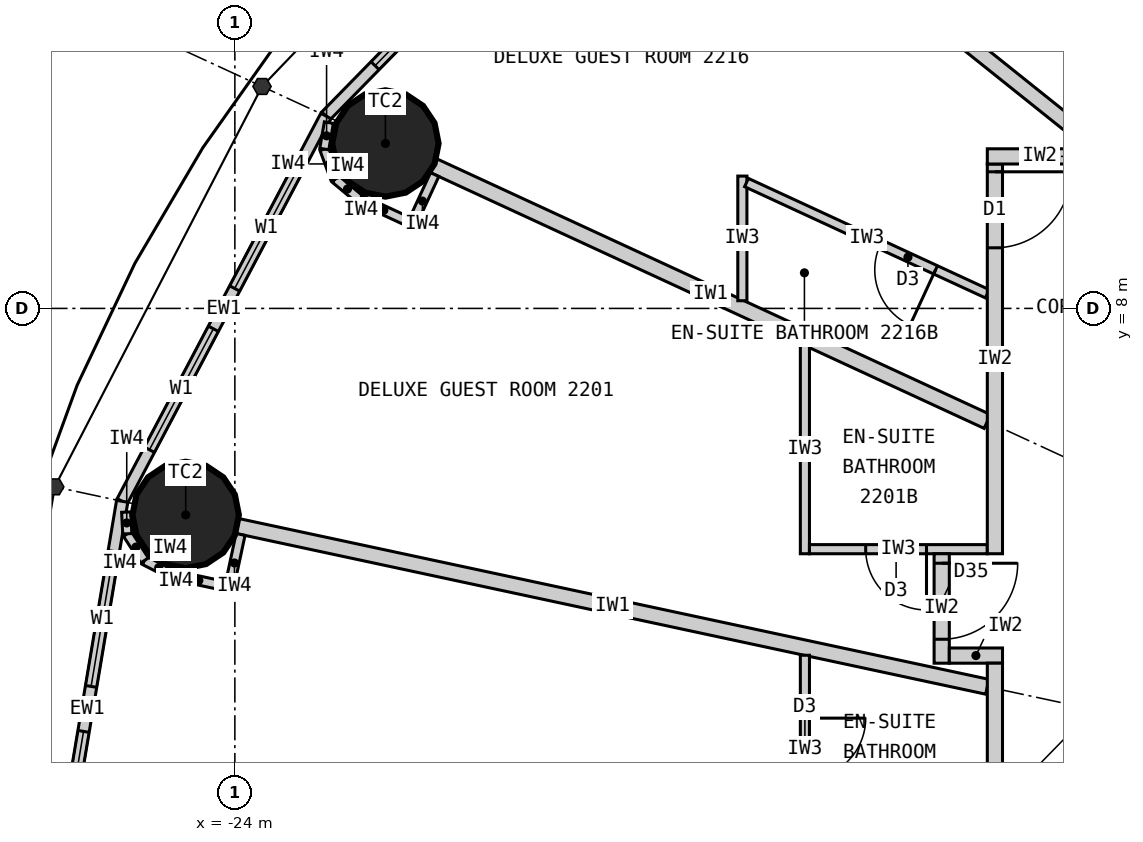
"""IFC4 building model, lengths in metres.
Left out: names, types, materials, properties, quantities, classifications, styles, units other than length and angle.
Written with IfcOpenShell. Run it as: python <this file> out.ifc"""

import sys

from ifc_helpers import new_model, si_unit, direction, frame, frame_2d, origin, origin_2d, place, context, subcontext, project, spatial, rectangle, circle, extrude, element, fill, save


model = new_model("IFC4")
c1 = context("Model", 3, precision=1e-05, world=origin(), true_north=direction((0.0, 1.0)))
c2 = subcontext(c1, "Body", "Model", "MODEL_VIEW")
j1 = project(units=[si_unit("LENGTHUNIT", "METRE"), si_unit("PLANEANGLEUNIT", "RADIAN")], contexts=[c1])
p1 = place(None, origin())
s1 = spatial("IfcSite", under=j1, at=p1, CompositionType="ELEMENT")
p2 = place(p1, origin())
s2 = spatial("IfcBuilding", under=s1, at=p2, CompositionType="ELEMENT")
p3 = place(p2, frame((0.0, 0.0, 87.0)))
s3 = spatial("IfcBuildingStorey", under=s2, at=p3, CompositionType="ELEMENT", Elevation=87.0)
for number, where, z_axis, x_axis in (
    (1, (-22.019, 10.17, 0.0), (0.0, 0.0, 1.0), (1.0, 0.0, 0.0)),
    (2, (-24.647, 5.283, 0.0), (0.0, 0.0, 1.0), (1.0, 0.0, 0.0)),
):
    element("IfcColumn", number, at=place(p3, frame(where, z_axis=z_axis, x_axis=x_axis)), inside=s3, PredefinedType="COLUMN", context=c2, shape_type="SweptSolid", body=[
        extrude(circle(Radius=0.7, at=origin_2d()), origin(), (0.0, 0.0, 1.0), 3.3),
    ])
p4 = place(p3, frame((-18.57, 14.856, 0.0), z_axis=(0.0, 0.0, 1.0), x_axis=(-0.699602905915, -0.714531856557, 0.0)))
e3 = element("IfcWall", 3, at=p4, inside=s3, PredefinedType="ELEMENTEDWALL", context=c2, shape_type="SweptSolid", body=[
    extrude(rectangle(XDim=6.051, YDim=0.15, at=frame_2d((3.025, 0.0))), origin(), (0.0, 0.0, 1.0), 3.12),
])
p5 = place(p4, frame((0.926, 0.0, 0.9)))
e4 = element("IfcOpeningElement", 4, at=p5, cuts=e3, PredefinedType="OPENING", context=c2, shape_type="SweptSolid", body=[
    extrude(rectangle(XDim=1.8, YDim=1.9, at=frame_2d((0.9, 0.95))), frame((0.0, 0.085, 0.0), z_axis=(0.0, -1.0, 0.0), x_axis=(1.0, 0.0, 0.0)), (0.0, 0.0, 1.0), 0.17),
])
p6 = place(p4, frame((3.325, 0.0, 0.9)))
e5 = element("IfcOpeningElement", 5, at=p6, cuts=e3, PredefinedType="OPENING", context=c2, shape_type="SweptSolid", body=[
    extrude(rectangle(XDim=1.8, YDim=1.9, at=frame_2d((0.9, 0.95))), frame((0.0, 0.085, 0.0), z_axis=(0.0, -1.0, 0.0), x_axis=(1.0, 0.0, 0.0)), (0.0, 0.0, 1.0), 0.17),
])
p7 = place(p3, frame((-22.803, 10.532, 0.0), z_axis=(0.0, 0.0, 1.0), x_axis=(-0.467296867008, -0.884100468321, 0.0)))
e6 = element("IfcWall", 6, at=p7, inside=s3, PredefinedType="ELEMENTEDWALL", context=c2, shape_type="SweptSolid", body=[
    extrude(rectangle(XDim=5.734, YDim=0.15, at=frame_2d((2.867, 0.0))), origin(), (0.0, 0.0, 1.0), 3.12),
])
p8 = place(p7, frame((0.767, 0.0, 0.9)))
e7 = element("IfcOpeningElement", 7, at=p8, cuts=e6, PredefinedType="OPENING", context=c2, shape_type="SweptSolid", body=[
    extrude(rectangle(XDim=1.8, YDim=1.9, at=frame_2d((0.9, 0.95))), frame((0.0, 0.085, 0.0), z_axis=(0.0, -1.0, 0.0), x_axis=(1.0, 0.0, 0.0)), (0.0, 0.0, 1.0), 0.17),
])
p9 = place(p7, frame((3.167, 0.0, 0.9)))
e8 = element("IfcOpeningElement", 8, at=p9, cuts=e6, PredefinedType="OPENING", context=c2, shape_type="SweptSolid", body=[
    extrude(rectangle(XDim=1.8, YDim=1.9, at=frame_2d((0.9, 0.95))), frame((0.0, 0.085, 0.0), z_axis=(0.0, -1.0, 0.0), x_axis=(1.0, 0.0, 0.0)), (0.0, 0.0, 1.0), 0.17),
])
p10 = place(p3, frame((-25.482, 5.462, 0.0), z_axis=(0.0, 0.0, 1.0), x_axis=(-0.165642551694, -0.986185857264, 0.0)))
e9 = element("IfcWall", 9, at=p10, inside=s3, PredefinedType="ELEMENTEDWALL", context=c2, shape_type="SweptSolid", body=[
    extrude(rectangle(XDim=5.539, YDim=0.15, at=frame_2d((2.77, 0.0))), origin(), (0.0, 0.0, 1.0), 3.12),
])
p11 = place(p10, frame((0.669, 0.0, 0.9)))
e10 = element("IfcOpeningElement", 10, at=p11, cuts=e9, PredefinedType="OPENING", context=c2, shape_type="SweptSolid", body=[
    extrude(rectangle(XDim=1.8, YDim=1.9, at=frame_2d((0.9, 0.95))), frame((0.0, 0.085, 0.0), z_axis=(0.0, -1.0, 0.0), x_axis=(1.0, 0.0, 0.0)), (0.0, 0.0, 1.0), 0.17),
])
p12 = place(p10, frame((3.07, 0.0, 0.9)))
e11 = element("IfcOpeningElement", 11, at=p12, cuts=e9, PredefinedType="OPENING", context=c2, shape_type="SweptSolid", body=[
    extrude(rectangle(XDim=1.8, YDim=1.9, at=frame_2d((0.9, 0.95))), frame((0.0, 0.085, 0.0), z_axis=(0.0, -1.0, 0.0), x_axis=(1.0, 0.0, 0.0)), (0.0, 0.0, 1.0), 0.17),
])
p13 = place(p3, frame((-12.625, 10.1, 0.0), z_axis=(0.0, 0.0, 1.0), x_axis=(-0.780892451574, 0.624665493744, 0.0)))
e12 = element("IfcWall", 12, at=p13, inside=s3, PredefinedType="PARTITIONING", context=c2, shape_type="SweptSolid", body=[
    extrude(rectangle(XDim=6.045, YDim=0.2, at=frame_2d((3.022, 0.0))), origin(), (0.0, 0.0, 1.0), 2.27),
])
p14 = place(p3, frame((-14.1, 6.512, 0.0), z_axis=(0.0, 0.0, 1.0), x_axis=(-0.907832871056, 0.419332181247, 0.0)))
e13 = element("IfcWall", 13, at=p14, inside=s3, PredefinedType="PARTITIONING", context=c2, shape_type="SweptSolid", body=[
    extrude(rectangle(XDim=8.023, YDim=0.2, at=frame_2d((4.011, 0.0))), origin(), (0.0, 0.0, 1.0), 2.22),
])
p15 = place(p3, frame((-14.1, 3.022, 0.0), z_axis=(0.0, 0.0, 1.0), x_axis=(-0.977790014929, 0.209586943072, 0.0)))
e14 = element("IfcWall", 14, at=p15, inside=s3, PredefinedType="PARTITIONING", context=c2, shape_type="SweptSolid", body=[
    extrude(rectangle(XDim=10.087, YDim=0.2, at=frame_2d((5.043, 0.0))), origin(), (0.0, 0.0, 1.0), 2.27),
])
p16 = place(p3, frame((-16.5, 7.521, 0.0), z_axis=(0.0, 0.0, 1.0), x_axis=(0.0, -1.0, 0.0)))
e15 = element("IfcWall", 15, at=p16, inside=s3, PredefinedType="PARTITIONING", context=c2, shape_type="SweptSolid", body=[
    extrude(rectangle(XDim=2.749, YDim=0.12, at=frame_2d((1.374, 0.0))), origin(), (0.0, 0.0, 1.0), 3.12),
])
p17 = place(p3, frame((-14.1, 4.833, 0.0), z_axis=(0.0, 0.0, 1.0), x_axis=(-1.0, 0.0, 0.0)))
e16 = element("IfcWall", 16, at=p17, inside=s3, PredefinedType="PARTITIONING", context=c2, shape_type="SweptSolid", body=[
    extrude(rectangle(XDim=2.34, YDim=0.12, at=frame_2d((1.17, 0.0))), origin(), (0.0, 0.0, 1.0), 3.12),
])
p18 = place(p17, frame((0.8, 0.0, 0.0)))
e17 = element("IfcOpeningElement", 17, at=p18, cuts=e16, PredefinedType="OPENING", context=c2, shape_type="SweptSolid", body=[
    extrude(rectangle(XDim=0.8, YDim=2.1, at=frame_2d((0.4, 1.05))), frame((0.0, 0.07, 0.0), z_axis=(0.0, -1.0, 0.0), x_axis=(1.0, 0.0, 0.0)), (0.0, 0.0, 1.0), 0.14),
])
p19 = place(p3, frame((-16.5, 3.437, 0.0), z_axis=(0.0, 0.0, 1.0), x_axis=(0.0, -1.0, 0.0)))
e18 = element("IfcWall", 18, at=p19, inside=s3, PredefinedType="PARTITIONING", context=c2, shape_type="SweptSolid", body=[
    extrude(rectangle(XDim=2.455, YDim=0.12, at=frame_2d((1.227, 0.0))), origin(), (0.0, 0.0, 1.0), 3.12),
])
p20 = place(p19, frame((0.827, 0.0, 0.0)))
e19 = element("IfcOpeningElement", 19, at=p20, cuts=e18, PredefinedType="OPENING", context=c2, shape_type="SweptSolid", body=[
    extrude(rectangle(XDim=0.8, YDim=2.1, at=frame_2d((0.4, 1.05))), frame((0.0, 0.07, 0.0), z_axis=(0.0, -1.0, 0.0), x_axis=(1.0, 0.0, 0.0)), (0.0, 0.0, 1.0), 0.14),
])
p21 = place(p3, frame((-17.323, 8.101, 0.0), z_axis=(0.0, 0.0, 1.0), x_axis=(0.0, 1.0, 0.0)))
e20 = element("IfcWall", 20, at=p21, inside=s3, PredefinedType="PARTITIONING", context=c2, shape_type="SweptSolid", body=[
    extrude(rectangle(XDim=1.64, YDim=0.12, at=frame_2d((0.82, 0.0))), origin(), (0.0, 0.0, 1.0), 3.12),
])
p22 = place(p3, frame((-14.1, 8.193, 0.0), z_axis=(0.0, 0.0, 1.0), x_axis=(-0.907836493557, 0.419324338628, 0.0)))
e21 = element("IfcWall", 21, at=p22, inside=s3, PredefinedType="PARTITIONING", context=c2, shape_type="SweptSolid", body=[
    extrude(rectangle(XDim=3.49, YDim=0.12, at=frame_2d((1.745, 0.0))), origin(), (0.0, 0.0, 1.0), 3.12),
])
p23 = place(p22, frame((0.75, 0.0, 0.0)))
e22 = element("IfcOpeningElement", 22, at=p23, cuts=e21, PredefinedType="OPENING", context=c2, shape_type="SweptSolid", body=[
    extrude(rectangle(XDim=0.8, YDim=2.1, at=frame_2d((0.4, 1.05))), frame((0.0, 0.07, 0.0), z_axis=(0.0, -1.0, 0.0), x_axis=(1.0, 0.0, 0.0)), (0.0, 0.0, 1.0), 0.14),
])
p24 = place(p3, frame((-14.7, 4.772, 0.0), z_axis=(0.0, 0.0, 1.0), x_axis=(0.0, -1.0, 0.0)))
e23 = element("IfcWall", 23, at=p24, inside=s3, PredefinedType="PARTITIONING", context=c2, shape_type="SweptSolid", body=[
    extrude(rectangle(XDim=1.44, YDim=0.2, at=frame_2d((0.72, 0.0))), origin(), (0.0, 0.0, 1.0), 3.12),
])
p25 = place(p24, frame((0.125, 0.0, 0.0)))
e24 = element("IfcOpeningElement", 24, at=p25, cuts=e23, PredefinedType="OPENING", context=c2, shape_type="SweptSolid", body=[
    extrude(rectangle(XDim=1.0, YDim=2.0, at=frame_2d((0.5, 1.0))), frame((0.0, 0.11, 0.0), z_axis=(0.0, -1.0, 0.0), x_axis=(1.0, 0.0, 0.0)), (0.0, 0.0, 1.0), 0.22),
])
p26 = place(p3, frame((-13.9, 3.433, 0.0), z_axis=(0.0, 0.0, 1.0), x_axis=(-1.0, 0.0, 0.0)))
e25 = element("IfcWall", 25, at=p26, inside=s3, PredefinedType="PARTITIONING", context=c2, shape_type="SweptSolid", body=[
    extrude(rectangle(XDim=0.7, YDim=0.2, at=frame_2d((0.35, 0.0))), origin(), (0.0, 0.0, 1.0), 2.27),
])
p27 = place(p3, frame((-14.0, 9.9, 0.0), z_axis=(0.0, 0.0, 1.0), x_axis=(0.0, -1.0, 0.0)))
e26 = element("IfcWall", 26, at=p27, inside=s3, PredefinedType="PARTITIONING", context=c2, shape_type="SweptSolid", body=[
    extrude(rectangle(XDim=5.127, YDim=0.2, at=frame_2d((2.564, 0.0))), origin(), (0.0, 0.0, 1.0), 3.12),
])
p28 = place(p27, frame((0.103, 0.0, 0.0)))
e27 = element("IfcOpeningElement", 27, at=p28, cuts=e26, PredefinedType="OPENING", context=c2, shape_type="SweptSolid", body=[
    extrude(rectangle(XDim=1.0, YDim=2.2, at=frame_2d((0.5, 1.1))), frame((0.0, 0.11, 0.0), z_axis=(0.0, -1.0, 0.0), x_axis=(1.0, 0.0, 0.0)), (0.0, 0.0, 1.0), 0.22),
])
p29 = place(p3, frame((-14.0, 3.333, 0.0), z_axis=(0.0, 0.0, 1.0), x_axis=(0.0, -1.0, 0.0)))
e28 = element("IfcWall", 28, at=p29, inside=s3, PredefinedType="PARTITIONING", context=c2, shape_type="SweptSolid", body=[
    extrude(rectangle(XDim=8.792, YDim=0.2, at=frame_2d((4.396, 0.0))), origin(), (0.0, 0.0, 1.0), 3.12),
])
p30 = place(p29, frame((3.59, 0.0, 0.0)))
e29 = element("IfcOpeningElement", 29, at=p30, cuts=e28, PredefinedType="OPENING", context=c2, shape_type="SweptSolid", body=[
    extrude(rectangle(XDim=1.0, YDim=2.2, at=frame_2d((0.5, 1.1))), frame((0.0, 0.11, 0.0), z_axis=(0.0, -1.0, 0.0), x_axis=(1.0, 0.0, 0.0)), (0.0, 0.0, 1.0), 0.22),
])
p31 = place(p29, frame((5.234, 0.0, 0.0)))
e30 = element("IfcOpeningElement", 30, at=p31, cuts=e28, PredefinedType="OPENING", context=c2, shape_type="SweptSolid", body=[
    extrude(rectangle(XDim=1.0, YDim=2.2, at=frame_2d((0.5, 1.1))), frame((0.0, 0.11, 0.0), z_axis=(0.0, -1.0, 0.0), x_axis=(1.0, 0.0, 0.0)), (0.0, 0.0, 1.0), 0.22),
])
p32 = place(p3, frame((-14.1, 10.0, 0.0), z_axis=(0.0, 0.0, 1.0), x_axis=(1.0, 0.0, 0.0)))
e31 = element("IfcWall", 31, at=p32, inside=s3, PredefinedType="PARTITIONING", context=c2, shape_type="SweptSolid", body=[
    extrude(rectangle(XDim=2.481, YDim=0.2, at=frame_2d((1.24, 0.0))), origin(), (0.0, 0.0, 1.0), 3.12),
])
p33 = place(p3, frame((-21.371, 9.761, 0.0), z_axis=(0.0, 0.0, 1.0), x_axis=(-0.419259891039, -0.907866258744, 0.0)))
e32 = element("IfcWall", 32, at=p33, inside=s3, PredefinedType="PARTITIONING", context=c2, shape_type="SweptSolid", body=[
    extrude(rectangle(XDim=0.768, YDim=0.12, at=frame_2d((0.384, 0.0))), origin(), (0.0, 0.0, 1.0), 3.12),
])
p34 = place(p3, frame((-21.722, 9.144, 0.0), z_axis=(0.0, 0.0, 1.0), x_axis=(-0.907877701396, 0.419235112208, 0.0)))
e33 = element("IfcWall", 33, at=p34, inside=s3, PredefinedType="PARTITIONING", context=c2, shape_type="SweptSolid", body=[
    extrude(rectangle(XDim=0.7, YDim=0.12, at=frame_2d((0.35, 0.0))), origin(), (0.0, 0.0, 1.0), 3.12),
])
p35 = place(p3, frame((-22.358, 9.437, 0.0), z_axis=(0.0, 0.0, 1.0), x_axis=(-0.768412687942, 0.639954639806, 0.0)))
e34 = element("IfcWall", 34, at=p35, inside=s3, PredefinedType="PARTITIONING", context=c2, shape_type="SweptSolid", body=[
    extrude(rectangle(XDim=0.418, YDim=0.12, at=frame_2d((0.209, 0.0))), origin(), (0.0, 0.0, 1.0), 3.12),
])
p36 = place(p3, frame((-22.679, 9.705, 0.0), z_axis=(0.0, 0.0, 1.0), x_axis=(-0.345164001646, 0.938542386879, 0.0)))
e35 = element("IfcWall", 35, at=p36, inside=s3, PredefinedType="PARTITIONING", context=c2, shape_type="SweptSolid", body=[
    extrude(rectangle(XDim=0.418, YDim=0.12, at=frame_2d((0.209, 0.0))), origin(), (0.0, 0.0, 1.0), 3.12),
])
p37 = place(p3, frame((-22.823, 10.097, 0.0), z_axis=(0.0, 0.0, 1.0), x_axis=(0.169674995186, 0.985500074079, 0.0)))
e36 = element("IfcWall", 36, at=p37, inside=s3, PredefinedType="PARTITIONING", context=c2, shape_type="SweptSolid", body=[
    extrude(rectangle(XDim=0.353, YDim=0.12, at=frame_2d((0.176, 0.0))), origin(), (0.0, 0.0, 1.0), 3.12),
])
p38 = place(p3, frame((-23.925, 5.026, 0.0), z_axis=(0.0, 0.0, 1.0), x_axis=(-0.209681192172, -0.977769808109, 0.0)))
e37 = element("IfcWall", 37, at=p38, inside=s3, PredefinedType="PARTITIONING", context=c2, shape_type="SweptSolid", body=[
    extrude(rectangle(XDim=0.767, YDim=0.12, at=frame_2d((0.384, 0.0))), origin(), (0.0, 0.0, 1.0), 3.12),
])
p39 = place(p3, frame((-24.132, 4.347, 0.0), z_axis=(0.0, 0.0, 1.0), x_axis=(-0.977776882509, 0.209648200638, 0.0)))
e38 = element("IfcWall", 38, at=p39, inside=s3, PredefinedType="PARTITIONING", context=c2, shape_type="SweptSolid", body=[
    extrude(rectangle(XDim=0.7, YDim=0.12, at=frame_2d((0.35, 0.0))), origin(), (0.0, 0.0, 1.0), 3.12),
])
for number, where, z_axis, x_axis in (
    (39, (-24.816, 4.494, 0.0), (0.0, 0.0, 1.0), (-0.89, 0.455, 0.0)),
    (40, (-25.188, 4.684, 0.0), (0.0, 0.0, 1.0), (-0.543, 0.84, 0.0)),
):
    element("IfcWall", number, at=place(p3, frame(where, z_axis=z_axis, x_axis=x_axis)), inside=s3, PredefinedType="PARTITIONING", context=c2, shape_type="SweptSolid", body=[
        extrude(rectangle(XDim=0.418, YDim=0.12, at=frame_2d((0.209, 0.0))), origin(), (0.0, 0.0, 1.0), 3.12),
    ])
p40 = place(p3, frame((-25.416, 5.035, 0.0), z_axis=(0.0, 0.0, 1.0), x_axis=(-0.050406329159, 0.998728793007, 0.0)))
e41 = element("IfcWall", 41, at=p40, inside=s3, PredefinedType="PARTITIONING", context=c2, shape_type="SweptSolid", body=[
    extrude(rectangle(XDim=0.286, YDim=0.12, at=frame_2d((0.143, 0.0))), origin(), (0.0, 0.0, 1.0), 3.12),
])
p41 = place(p6, origin())
e42 = element("IfcWindow", 42, at=p41, inside=s3, PartitioningType="SINGLE_PANEL", PredefinedType="WINDOW", context=c2, shape_type="SweptSolid", body=[
    extrude(rectangle(XDim=1.8, YDim=1.9, at=frame_2d((0.9, 0.95))), frame((0.0, 0.03, 0.0), z_axis=(0.0, -1.0, 0.0), x_axis=(1.0, 0.0, 0.0)), (0.0, 0.0, 1.0), 0.06),
])
fill(e5, e42)
p42 = place(p8, origin())
e43 = element("IfcWindow", 43, at=p42, inside=s3, PartitioningType="SINGLE_PANEL", PredefinedType="WINDOW", context=c2, shape_type="SweptSolid", body=[
    extrude(rectangle(XDim=1.8, YDim=1.9, at=frame_2d((0.9, 0.95))), frame((0.0, 0.03, 0.0), z_axis=(0.0, -1.0, 0.0), x_axis=(1.0, 0.0, 0.0)), (0.0, 0.0, 1.0), 0.06),
])
fill(e7, e43)
p43 = place(p9, origin())
e44 = element("IfcWindow", 44, at=p43, inside=s3, PartitioningType="SINGLE_PANEL", PredefinedType="WINDOW", context=c2, shape_type="SweptSolid", body=[
    extrude(rectangle(XDim=1.8, YDim=1.9, at=frame_2d((0.9, 0.95))), frame((0.0, 0.03, 0.0), z_axis=(0.0, -1.0, 0.0), x_axis=(1.0, 0.0, 0.0)), (0.0, 0.0, 1.0), 0.06),
])
fill(e8, e44)
p44 = place(p11, origin())
e45 = element("IfcWindow", 45, at=p44, inside=s3, PartitioningType="SINGLE_PANEL", PredefinedType="WINDOW", context=c2, shape_type="SweptSolid", body=[
    extrude(rectangle(XDim=1.8, YDim=1.9, at=frame_2d((0.9, 0.95))), frame((0.0, 0.03, 0.0), z_axis=(0.0, -1.0, 0.0), x_axis=(1.0, 0.0, 0.0)), (0.0, 0.0, 1.0), 0.06),
])
fill(e10, e45)
p45 = place(p12, origin())
e46 = element("IfcWindow", 46, at=p45, inside=s3, PartitioningType="SINGLE_PANEL", PredefinedType="WINDOW", context=c2, shape_type="SweptSolid", body=[
    extrude(rectangle(XDim=1.8, YDim=1.9, at=frame_2d((0.9, 0.95))), frame((0.0, 0.03, 0.0), z_axis=(0.0, -1.0, 0.0), x_axis=(1.0, 0.0, 0.0)), (0.0, 0.0, 1.0), 0.06),
])
fill(e11, e46)
p46 = place(p18, origin())
e47 = element("IfcDoor", 47, at=p46, inside=s3, OperationType="SINGLE_SWING_LEFT", PredefinedType="DOOR", context=c2, shape_type="SweptSolid", body=[
    extrude(rectangle(XDim=0.8, YDim=2.1, at=frame_2d((0.4, 1.05))), frame((0.0, 0.025, 0.0), z_axis=(0.0, -1.0, 0.0), x_axis=(1.0, 0.0, 0.0)), (0.0, 0.0, 1.0), 0.05),
])
fill(e17, e47)
p47 = place(p25, origin())
e48 = element("IfcDoor", 48, at=p47, inside=s3, OperationType="SINGLE_SWING_LEFT", PredefinedType="DOOR", context=c2, shape_type="SweptSolid", body=[
    extrude(rectangle(XDim=1.0, YDim=2.0, at=frame_2d((0.5, 1.0))), frame((0.0, 0.025, 0.0), z_axis=(0.0, -1.0, 0.0), x_axis=(1.0, 0.0, 0.0)), (0.0, 0.0, 1.0), 0.05),
])
fill(e24, e48)
p48 = place(p20, origin())
e49 = element("IfcDoor", 49, at=p48, inside=s3, OperationType="SINGLE_SWING_LEFT", PredefinedType="DOOR", context=c2, shape_type="SweptSolid", body=[
    extrude(rectangle(XDim=0.8, YDim=2.1, at=frame_2d((0.4, 1.05))), frame((0.0, 0.025, 0.0), z_axis=(0.0, -1.0, 0.0), x_axis=(1.0, 0.0, 0.0)), (0.0, 0.0, 1.0), 0.05),
])
fill(e19, e49)
p49 = place(p23, origin())
e50 = element("IfcDoor", 50, at=p49, inside=s3, OperationType="SINGLE_SWING_LEFT", PredefinedType="DOOR", context=c2, shape_type="SweptSolid", body=[
    extrude(rectangle(XDim=0.8, YDim=2.1, at=frame_2d((0.4, 1.05))), frame((0.0, 0.025, 0.0), z_axis=(0.0, -1.0, 0.0), x_axis=(1.0, 0.0, 0.0)), (0.0, 0.0, 1.0), 0.05),
])
fill(e22, e50)
p50 = place(p28, origin())
e51 = element("IfcDoor", 51, at=p50, inside=s3, OperationType="SINGLE_SWING_LEFT", PredefinedType="DOOR", context=c2, shape_type="SweptSolid", body=[
    extrude(rectangle(XDim=1.0, YDim=2.2, at=frame_2d((0.5, 1.1))), frame((0.0, 0.025, 0.0), z_axis=(0.0, -1.0, 0.0), x_axis=(1.0, 0.0, 0.0)), (0.0, 0.0, 1.0), 0.05),
])
fill(e27, e51)
save(model, sys.argv[1])
